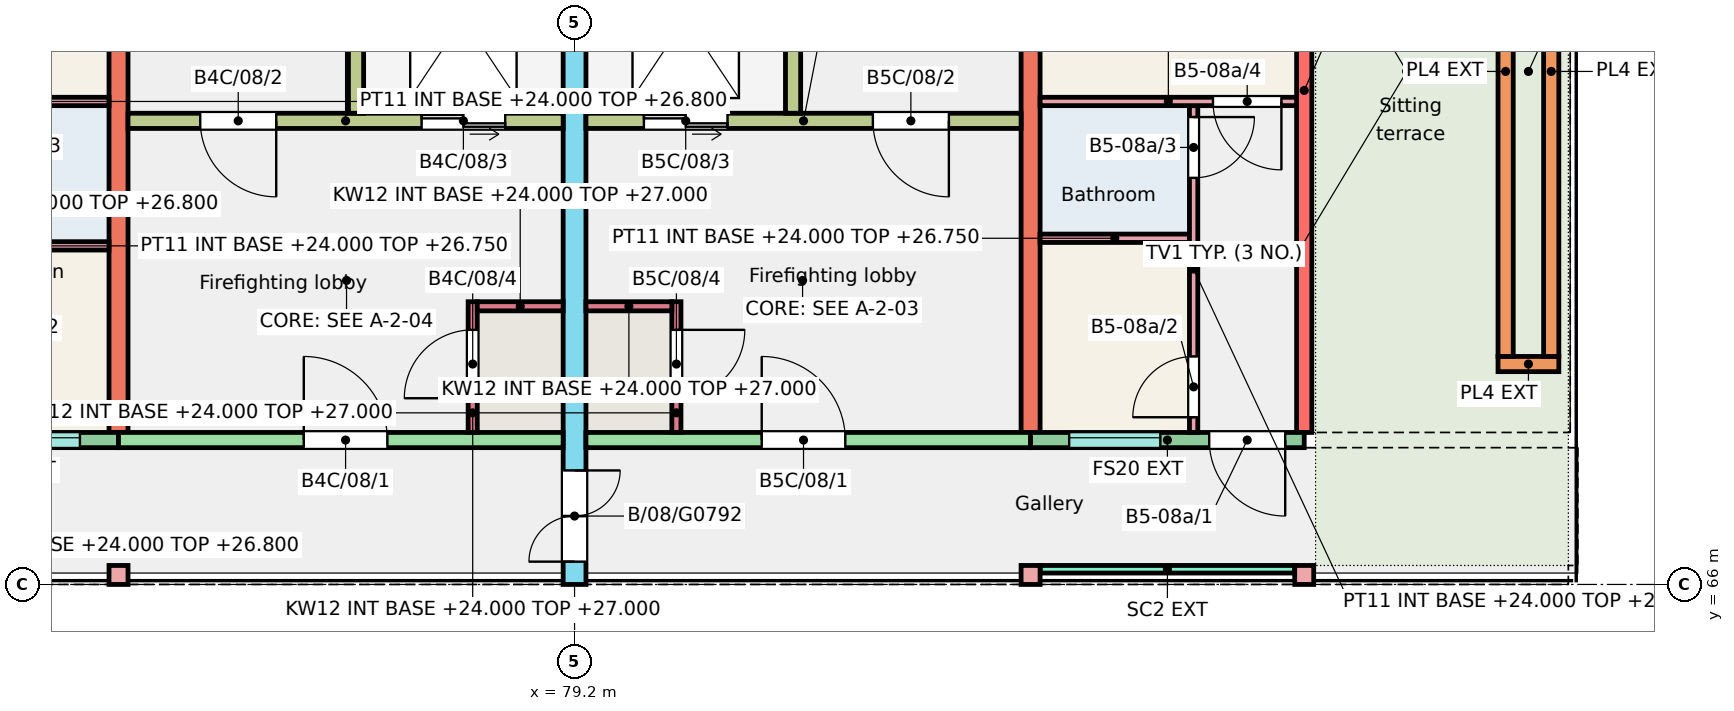
"""IFC4 building model, lengths in metres.
Left out: names, types, materials, properties, quantities, classifications, styles, units other than length and angle.
Written with IfcOpenShell. Run it as: python <this file> out.ifc"""

import sys

from ifc_helpers import new_model, si_unit, direction, frame, frame_2d, origin, origin_2d, place, context, subcontext, project, spatial, rectangle, extrude, element, fill, save


model = new_model("IFC4")
c1 = context("Model", 3, precision=1e-05, world=origin(), true_north=direction((0.0, 1.0)))
c2 = subcontext(c1, "Body", "Model", "MODEL_VIEW")
j1 = project(units=[si_unit("LENGTHUNIT", "METRE"), si_unit("PLANEANGLEUNIT", "RADIAN")], contexts=[c1])
p1 = place(None, origin())
s1 = spatial("IfcSite", under=j1, at=p1, CompositionType="ELEMENT")
p2 = place(p1, origin())
s2 = spatial("IfcBuilding", under=s1, at=p2, CompositionType="ELEMENT")
p3 = place(p2, frame((0.0, 0.0, 24.0)))
s3 = spatial("IfcBuildingStorey", under=s2, at=p3, CompositionType="ELEMENT", Elevation=24.0)
p4 = place(p3, frame((73.2, 68.0, 0.0), z_axis=(0.0, 0.0, 1.0), x_axis=(0.0, 1.0, 0.0)))
e1 = element("IfcWall", 1, at=p4, inside=s3, PredefinedType="SHEAR", context=c2, shape_type="SweptSolid", body=[
    extrude(rectangle(XDim=9.0, YDim=0.25, at=frame_2d((4.5, 0.0))), origin(), (0.0, 0.0, 1.0), 3.0),
])
p5 = place(p3, frame((79.2, 66.0, 0.0), z_axis=(0.0, 0.0, 1.0), x_axis=(0.0, 1.0, 0.0)))
e2 = element("IfcWall", 2, at=p5, inside=s3, PredefinedType="SHEAR", context=c2, shape_type="SweptSolid", body=[
    extrude(rectangle(XDim=11.0, YDim=0.3, at=frame_2d((5.5, 0.0))), origin(), (0.0, 0.0, 1.0), 3.0),
])
p6 = place(p5, frame((0.3, 0.0, 0.0)))
e3 = element("IfcOpeningElement", 3, at=p6, cuts=e2, PredefinedType="OPENING", context=c2, shape_type="SweptSolid", body=[
    extrude(rectangle(XDim=1.2, YDim=2.1, at=frame_2d((0.6, 1.05))), frame((0.0, 0.16, 0.0), z_axis=(0.0, -1.0, 0.0), x_axis=(1.0, 0.0, 0.0)), (0.0, 0.0, 1.0), 0.32),
])
p7 = place(p3, frame((85.2, 68.0, 0.0), z_axis=(0.0, 0.0, 1.0), x_axis=(0.0, 1.0, 0.0)))
e4 = element("IfcWall", 4, at=p7, inside=s3, PredefinedType="SHEAR", context=c2, shape_type="SweptSolid", body=[
    extrude(rectangle(XDim=9.0, YDim=0.25, at=frame_2d((4.5, 0.0))), origin(), (0.0, 0.0, 1.0), 3.0),
])
p8 = place(p3, frame((88.8, 68.0, 0.0), z_axis=(0.0, 0.0, 1.0), x_axis=(0.0, 1.0, 0.0)))
e5 = element("IfcWall", 5, at=p8, inside=s3, PredefinedType="SHEAR", context=c2, shape_type="SweptSolid", body=[
    extrude(rectangle(XDim=9.0, YDim=0.2, at=frame_2d((4.5, 0.0))), origin(), (0.0, 0.0, 1.0), 3.0),
])
p9 = place(p8, frame((7.552, 0.0, 0.9)))
e6 = element("IfcOpeningElement", 6, at=p9, cuts=e5, PredefinedType="OPENING", context=c2, shape_type="SweptSolid", body=[
    extrude(rectangle(XDim=1.2, YDim=1.5, at=frame_2d((0.6, 0.75))), frame((0.0, 0.11, 0.0), z_axis=(0.0, -1.0, 0.0), x_axis=(1.0, 0.0, 0.0)), (0.0, 0.0, 1.0), 0.22),
])
p10 = place(p8, frame((6.205, 0.0, 0.0)))
e7 = element("IfcOpeningElement", 7, at=p10, cuts=e5, PredefinedType="OPENING", context=c2, shape_type="SweptSolid", body=[
    extrude(rectangle(XDim=1.0, YDim=2.1, at=frame_2d((0.5, 1.05))), frame((0.0, 0.11, 0.0), z_axis=(0.0, -1.0, 0.0), x_axis=(1.0, 0.0, 0.0)), (0.0, 0.0, 1.0), 0.22),
])
p11 = place(p3, frame((69.6, 67.9, 0.0), z_axis=(0.0, 0.0, 1.0), x_axis=(1.0, 0.0, 0.0)))
e8 = element("IfcWall", 8, at=p11, inside=s3, PredefinedType="SOLIDWALL", context=c2, shape_type="SweptSolid", body=[
    extrude(rectangle(XDim=3.6, YDim=0.2, at=frame_2d((1.8, 0.0))), origin(), (0.0, 0.0, 1.0), 3.0),
])
p12 = place(p11, frame((1.893, 0.0, 1.1)))
e9 = element("IfcOpeningElement", 9, at=p12, cuts=e8, PredefinedType="OPENING", context=c2, shape_type="SweptSolid", body=[
    extrude(rectangle(XDim=1.2, YDim=1.3, at=frame_2d((0.6, 0.65))), frame((0.0, 0.11, 0.0), z_axis=(0.0, -1.0, 0.0), x_axis=(1.0, 0.0, 0.0)), (0.0, 0.0, 1.0), 0.22),
])
p13 = place(p11, frame((0.25, 0.0, 0.0)))
e10 = element("IfcOpeningElement", 10, at=p13, cuts=e8, PredefinedType="OPENING", context=c2, shape_type="SweptSolid", body=[
    extrude(rectangle(XDim=1.0, YDim=2.1, at=frame_2d((0.5, 1.05))), frame((0.0, 0.11, 0.0), z_axis=(0.0, -1.0, 0.0), x_axis=(1.0, 0.0, 0.0)), (0.0, 0.0, 1.0), 0.22),
])
p14 = place(p3, frame((73.2, 67.9, 0.0), z_axis=(0.0, 0.0, 1.0), x_axis=(1.0, 0.0, 0.0)))
e11 = element("IfcWall", 11, at=p14, inside=s3, PredefinedType="SHEAR", context=c2, shape_type="SweptSolid", body=[
    extrude(rectangle(XDim=5.85, YDim=0.2, at=frame_2d((2.925, 0.0))), origin(), (0.0, 0.0, 1.0), 3.0),
])
p15 = place(p14, frame((2.438, 0.0, 0.0)))
e12 = element("IfcOpeningElement", 12, at=p15, cuts=e11, PredefinedType="OPENING", context=c2, shape_type="SweptSolid", body=[
    extrude(rectangle(XDim=1.1, YDim=2.1, at=frame_2d((0.55, 1.05))), frame((0.0, 0.11, 0.0), z_axis=(0.0, -1.0, 0.0), x_axis=(1.0, 0.0, 0.0)), (0.0, 0.0, 1.0), 0.22),
])
p16 = place(p3, frame((73.325, 72.1, 0.0), z_axis=(0.0, 0.0, 1.0), x_axis=(1.0, 0.0, 0.0)))
e13 = element("IfcWall", 13, at=p16, inside=s3, PredefinedType="SHEAR", context=c2, shape_type="SweptSolid", body=[
    extrude(rectangle(XDim=5.725, YDim=0.2, at=frame_2d((2.863, 0.0))), origin(), (0.0, 0.0, 1.0), 3.0),
])
p17 = place(p16, frame((0.95, 0.0, 0.0)))
e14 = element("IfcOpeningElement", 14, at=p17, cuts=e13, PredefinedType="OPENING", context=c2, shape_type="SweptSolid", body=[
    extrude(rectangle(XDim=1.0, YDim=2.1, at=frame_2d((0.5, 1.05))), frame((0.0, 0.11, 0.0), z_axis=(0.0, -1.0, 0.0), x_axis=(1.0, 0.0, 0.0)), (0.0, 0.0, 1.0), 0.22),
])
p18 = place(p16, frame((3.863, 0.0, 0.0)))
e15 = element("IfcOpeningElement", 15, at=p18, cuts=e13, PredefinedType="OPENING", context=c2, shape_type="SweptSolid", body=[
    extrude(rectangle(XDim=1.1, YDim=2.1, at=frame_2d((0.55, 1.05))), frame((0.0, 0.11, 0.0), z_axis=(0.0, -1.0, 0.0), x_axis=(1.0, 0.0, 0.0)), (0.0, 0.0, 1.0), 0.22),
])
p19 = place(p3, frame((76.325, 72.2, 0.0), z_axis=(0.0, 0.0, 1.0), x_axis=(0.0, 1.0, 0.0)))
e16 = element("IfcWall", 16, at=p19, inside=s3, PredefinedType="SHEAR", context=c2, shape_type="SweptSolid", body=[
    extrude(rectangle(XDim=4.8, YDim=0.2, at=frame_2d((2.4, 0.0))), origin(), (0.0, 0.0, 1.0), 3.0),
])
p20 = place(p3, frame((77.86, 68.0, 0.0), z_axis=(0.0, 0.0, 1.0), x_axis=(0.0, 1.0, 0.0)))
e17 = element("IfcWall", 17, at=p20, inside=s3, PredefinedType="SHEAR", context=c2, shape_type="SweptSolid", body=[
    extrude(rectangle(XDim=1.72, YDim=0.12, at=frame_2d((0.86, 0.0))), origin(), (0.0, 0.0, 1.0), 3.0),
])
p21 = place(p20, frame((0.45, 0.0, 0.0)))
e18 = element("IfcOpeningElement", 18, at=p21, cuts=e17, PredefinedType="OPENING", context=c2, shape_type="SweptSolid", body=[
    extrude(rectangle(XDim=0.9, YDim=2.1, at=frame_2d((0.45, 1.05))), frame((0.0, 0.07, 0.0), z_axis=(0.0, -1.0, 0.0), x_axis=(1.0, 0.0, 0.0)), (0.0, 0.0, 1.0), 0.14),
])
p22 = place(p3, frame((77.92, 69.66, 0.0), z_axis=(0.0, 0.0, 1.0), x_axis=(1.0, 0.0, 0.0)))
e19 = element("IfcWall", 19, at=p22, inside=s3, PredefinedType="SHEAR", context=c2, shape_type="SweptSolid", body=[
    extrude(rectangle(XDim=1.13, YDim=0.12, at=frame_2d((0.565, 0.0))), origin(), (0.0, 0.0, 1.0), 3.0),
])
p23 = place(p3, frame((79.35, 67.9, 0.0), z_axis=(0.0, 0.0, 1.0), x_axis=(1.0, 0.0, 0.0)))
e20 = element("IfcWall", 20, at=p23, inside=s3, PredefinedType="SHEAR", context=c2, shape_type="SweptSolid", body=[
    extrude(rectangle(XDim=5.85, YDim=0.2, at=frame_2d((2.925, 0.0))), origin(), (0.0, 0.0, 1.0), 3.0),
])
p24 = place(p23, frame((2.312, 0.0, 0.0)))
e21 = element("IfcOpeningElement", 21, at=p24, cuts=e20, PredefinedType="OPENING", context=c2, shape_type="SweptSolid", body=[
    extrude(rectangle(XDim=1.1, YDim=2.1, at=frame_2d((0.55, 1.05))), frame((0.0, 0.11, 0.0), z_axis=(0.0, -1.0, 0.0), x_axis=(1.0, 0.0, 0.0)), (0.0, 0.0, 1.0), 0.22),
])
p25 = place(p3, frame((79.35, 72.1, 0.0), z_axis=(0.0, 0.0, 1.0), x_axis=(1.0, 0.0, 0.0)))
e22 = element("IfcWall", 22, at=p25, inside=s3, PredefinedType="SHEAR", context=c2, shape_type="SweptSolid", body=[
    extrude(rectangle(XDim=5.725, YDim=0.2, at=frame_2d((2.862, 0.0))), origin(), (0.0, 0.0, 1.0), 3.0),
])
p26 = place(p25, frame((3.775, 0.0, 0.0)))
e23 = element("IfcOpeningElement", 23, at=p26, cuts=e22, PredefinedType="OPENING", context=c2, shape_type="SweptSolid", body=[
    extrude(rectangle(XDim=1.0, YDim=2.1, at=frame_2d((0.5, 1.05))), frame((0.0, 0.11, 0.0), z_axis=(0.0, -1.0, 0.0), x_axis=(1.0, 0.0, 0.0)), (0.0, 0.0, 1.0), 0.22),
])
p27 = place(p25, frame((0.762, 0.0, 0.0)))
e24 = element("IfcOpeningElement", 24, at=p27, cuts=e22, PredefinedType="OPENING", context=c2, shape_type="SweptSolid", body=[
    extrude(rectangle(XDim=1.1, YDim=2.1, at=frame_2d((0.55, 1.05))), frame((0.0, 0.11, 0.0), z_axis=(0.0, -1.0, 0.0), x_axis=(1.0, 0.0, 0.0)), (0.0, 0.0, 1.0), 0.22),
])
p28 = place(p3, frame((82.075, 72.2, 0.0), z_axis=(0.0, 0.0, 1.0), x_axis=(0.0, 1.0, 0.0)))
e25 = element("IfcWall", 25, at=p28, inside=s3, PredefinedType="SHEAR", context=c2, shape_type="SweptSolid", body=[
    extrude(rectangle(XDim=4.8, YDim=0.2, at=frame_2d((2.4, 0.0))), origin(), (0.0, 0.0, 1.0), 3.0),
])
p29 = place(p3, frame((80.54, 68.0, 0.0), z_axis=(0.0, 0.0, 1.0), x_axis=(0.0, 1.0, 0.0)))
e26 = element("IfcWall", 26, at=p29, inside=s3, PredefinedType="SHEAR", context=c2, shape_type="SweptSolid", body=[
    extrude(rectangle(XDim=1.72, YDim=0.12, at=frame_2d((0.86, 0.0))), origin(), (0.0, 0.0, 1.0), 3.0),
])
p30 = place(p29, frame((0.45, 0.0, 0.0)))
e27 = element("IfcOpeningElement", 27, at=p30, cuts=e26, PredefinedType="OPENING", context=c2, shape_type="SweptSolid", body=[
    extrude(rectangle(XDim=0.9, YDim=2.1, at=frame_2d((0.45, 1.05))), frame((0.0, 0.07, 0.0), z_axis=(0.0, -1.0, 0.0), x_axis=(1.0, 0.0, 0.0)), (0.0, 0.0, 1.0), 0.14),
])
p31 = place(p3, frame((79.35, 69.66, 0.0), z_axis=(0.0, 0.0, 1.0), x_axis=(1.0, 0.0, 0.0)))
e28 = element("IfcWall", 28, at=p31, inside=s3, PredefinedType="SHEAR", context=c2, shape_type="SweptSolid", body=[
    extrude(rectangle(XDim=1.13, YDim=0.12, at=frame_2d((0.565, 0.0))), origin(), (0.0, 0.0, 1.0), 3.0),
])
p32 = place(p3, frame((85.2, 67.9, 0.0), z_axis=(0.0, 0.0, 1.0), x_axis=(1.0, 0.0, 0.0)))
e29 = element("IfcWall", 29, at=p32, inside=s3, PredefinedType="SOLIDWALL", context=c2, shape_type="SweptSolid", body=[
    extrude(rectangle(XDim=3.6, YDim=0.2, at=frame_2d((1.8, 0.0))), origin(), (0.0, 0.0, 1.0), 3.0),
])
p33 = place(p32, frame((0.508, 0.0, 1.1)))
e30 = element("IfcOpeningElement", 30, at=p33, cuts=e29, PredefinedType="OPENING", context=c2, shape_type="SweptSolid", body=[
    extrude(rectangle(XDim=1.2, YDim=1.3, at=frame_2d((0.6, 0.65))), frame((0.0, 0.11, 0.0), z_axis=(0.0, -1.0, 0.0), x_axis=(1.0, 0.0, 0.0)), (0.0, 0.0, 1.0), 0.22),
])
p34 = place(p32, frame((2.35, 0.0, 0.0)))
e31 = element("IfcOpeningElement", 31, at=p34, cuts=e29, PredefinedType="OPENING", context=c2, shape_type="SweptSolid", body=[
    extrude(rectangle(XDim=1.0, YDim=2.1, at=frame_2d((0.5, 1.05))), frame((0.0, 0.11, 0.0), z_axis=(0.0, -1.0, 0.0), x_axis=(1.0, 0.0, 0.0)), (0.0, 0.0, 1.0), 0.22),
])
for number, where, z_axis, x_axis in (
    (32, (73.2, 66.125, 0.0), (0.0, 0.0, 1.0), (1.0, 0.0, 0.0)),
    (33, (85.2, 66.125, 0.0), (0.0, 0.0, 1.0), (1.0, 0.0, 0.0)),
    (34, (88.8, 66.125, 0.0), (0.0, 0.0, 1.0), (1.0, 0.0, 0.0)),
):
    element("IfcColumn", number, at=place(p3, frame(where, z_axis=z_axis, x_axis=x_axis)), inside=s3, PredefinedType="COLUMN", context=c2, shape_type="SweptSolid", body=[
        extrude(rectangle(XDim=0.25, YDim=0.25, at=origin_2d()), origin(), (0.0, 0.0, 1.0), 3.0),
    ])
p35 = place(p3, frame((91.35, 68.9, 0.01), z_axis=(0.0, 0.0, 1.0), x_axis=(1.0, 0.0, 0.0)))
e35 = element("IfcWall", 35, at=p35, inside=s3, PredefinedType="SOLIDWALL", context=c2, shape_type="SweptSolid", body=[
    extrude(rectangle(XDim=0.8, YDim=0.2, at=frame_2d((0.4, 0.0))), origin(), (0.0, 0.0, 1.0), 0.45),
])
for number, where, z_axis, x_axis in (
    (36, (91.45, 69.0, 0.01), (0.0, 0.0, 1.0), (0.0, 1.0, 0.0)),
    (37, (92.05, 69.0, 0.01), (0.0, 0.0, 1.0), (0.0, 1.0, 0.0)),
):
    element("IfcWall", number, at=place(p3, frame(where, z_axis=z_axis, x_axis=x_axis)), inside=s3, PredefinedType="SOLIDWALL", context=c2, shape_type="SweptSolid", body=[
        extrude(rectangle(XDim=7.5, YDim=0.2, at=frame_2d((3.75, 0.0))), origin(), (0.0, 0.0, 1.0), 0.45),
    ])
p36 = place(p3, frame((85.325, 66.2, 0.0), z_axis=(0.0, 0.0, 1.0), x_axis=(1.0, 0.0, 0.0)))
e38 = element("IfcWall", 38, at=p36, inside=s3, PredefinedType="SOLIDWALL", context=c2, shape_type="SweptSolid", body=[
    extrude(rectangle(XDim=3.35, YDim=0.1, at=frame_2d((1.675, 0.0))), origin(), (0.0, 0.0, 1.0), 2.45),
])
p37 = place(p3, frame((71.11, 70.455, 0.0), z_axis=(0.0, 0.0, 1.0), x_axis=(1.0, 0.0, 0.0)))
e39 = element("IfcWall", 39, at=p37, inside=s3, PredefinedType="PARTITIONING", context=c2, shape_type="SweptSolid", body=[
    extrude(rectangle(XDim=1.965, YDim=0.11, at=frame_2d((0.982, 0.0))), origin(), (0.0, 0.0, 1.0), 2.8),
])
p38 = place(p3, frame((69.7, 72.355, 0.0), z_axis=(0.0, 0.0, 1.0), x_axis=(1.0, 0.0, 0.0)))
e40 = element("IfcWall", 40, at=p38, inside=s3, PredefinedType="PARTITIONING", context=c2, shape_type="SweptSolid", body=[
    extrude(rectangle(XDim=3.375, YDim=0.11, at=frame_2d((1.688, 0.0))), origin(), (0.0, 0.0, 1.0), 2.8),
])
p39 = place(p38, frame((0.2, 0.0, 0.0)))
e41 = element("IfcOpeningElement", 41, at=p39, cuts=e40, PredefinedType="OPENING", context=c2, shape_type="SweptSolid", body=[
    extrude(rectangle(XDim=0.9, YDim=2.1, at=frame_2d((0.45, 1.05))), frame((0.0, 0.065, 0.0), z_axis=(0.0, -1.0, 0.0), x_axis=(1.0, 0.0, 0.0)), (0.0, 0.0, 1.0), 0.13),
])
p40 = place(p3, frame((85.325, 70.555, 0.0), z_axis=(0.0, 0.0, 1.0), x_axis=(1.0, 0.0, 0.0)))
e42 = element("IfcWall", 42, at=p40, inside=s3, PredefinedType="PARTITIONING", context=c2, shape_type="SweptSolid", body=[
    extrude(rectangle(XDim=1.965, YDim=0.11, at=frame_2d((0.982, 0.0))), origin(), (0.0, 0.0, 1.0), 2.75),
])
p41 = place(p3, frame((87.345, 68.0, 0.0), z_axis=(0.0, 0.0, 1.0), x_axis=(0.0, 1.0, 0.0)))
e43 = element("IfcWall", 43, at=p41, inside=s3, PredefinedType="PARTITIONING", context=c2, shape_type="SweptSolid", body=[
    extrude(rectangle(XDim=4.3, YDim=0.11, at=frame_2d((2.15, 0.0))), origin(), (0.0, 0.0, 1.0), 2.75),
])
p42 = place(p41, frame((0.2, 0.0, 0.0)))
e44 = element("IfcOpeningElement", 44, at=p42, cuts=e43, PredefinedType="OPENING", context=c2, shape_type="SweptSolid", body=[
    extrude(rectangle(XDim=0.8, YDim=2.1, at=frame_2d((0.4, 1.05))), frame((0.0, 0.065, 0.0), z_axis=(0.0, -1.0, 0.0), x_axis=(1.0, 0.0, 0.0)), (0.0, 0.0, 1.0), 0.13),
])
p43 = place(p41, frame((3.35, 0.0, 0.0)))
e45 = element("IfcOpeningElement", 45, at=p43, cuts=e43, PredefinedType="OPENING", context=c2, shape_type="SweptSolid", body=[
    extrude(rectangle(XDim=0.8, YDim=2.1, at=frame_2d((0.4, 1.05))), frame((0.0, 0.065, 0.0), z_axis=(0.0, -1.0, 0.0), x_axis=(1.0, 0.0, 0.0)), (0.0, 0.0, 1.0), 0.13),
])
p44 = place(p3, frame((85.325, 72.355, 0.0), z_axis=(0.0, 0.0, 1.0), x_axis=(1.0, 0.0, 0.0)))
e46 = element("IfcWall", 46, at=p44, inside=s3, PredefinedType="PARTITIONING", context=c2, shape_type="SweptSolid", body=[
    extrude(rectangle(XDim=3.375, YDim=0.11, at=frame_2d((1.688, 0.0))), origin(), (0.0, 0.0, 1.0), 2.75),
])
p45 = place(p44, frame((2.275, 0.0, 0.0)))
e47 = element("IfcOpeningElement", 47, at=p45, cuts=e46, PredefinedType="OPENING", context=c2, shape_type="SweptSolid", body=[
    extrude(rectangle(XDim=0.9, YDim=2.1, at=frame_2d((0.45, 1.05))), frame((0.0, 0.065, 0.0), z_axis=(0.0, -1.0, 0.0), x_axis=(1.0, 0.0, 0.0)), (0.0, 0.0, 1.0), 0.13),
])
p46 = place(p12, origin())
e48 = element("IfcWindow", 48, at=p46, inside=s3, PartitioningType="SINGLE_PANEL", PredefinedType="WINDOW", context=c2, shape_type="SweptSolid", body=[
    extrude(rectangle(XDim=1.2, YDim=1.3, at=frame_2d((0.6, 0.65))), frame((0.0, 0.06, 0.0), z_axis=(0.0, -1.0, 0.0), x_axis=(1.0, 0.0, 0.0)), (0.0, 0.0, 1.0), 0.06),
])
fill(e9, e48)
p47 = place(p33, origin())
e49 = element("IfcWindow", 49, at=p47, inside=s3, PartitioningType="SINGLE_PANEL", PredefinedType="WINDOW", context=c2, shape_type="SweptSolid", body=[
    extrude(rectangle(XDim=1.2, YDim=1.3, at=frame_2d((0.6, 0.65))), frame((0.0, 0.06, 0.0), z_axis=(0.0, -1.0, 0.0), x_axis=(1.0, 0.0, 0.0)), (0.0, 0.0, 1.0), 0.06),
])
fill(e30, e49)
p48 = place(p34, origin())
e50 = element("IfcDoor", 50, at=p48, inside=s3, OperationType="SINGLE_SWING_RIGHT", PredefinedType="DOOR", context=c2, shape_type="SweptSolid", body=[
    extrude(rectangle(XDim=1.0, YDim=2.1, at=frame_2d((0.5, 1.05))), frame((0.0, 0.025, 0.0), z_axis=(0.0, -1.0, 0.0), x_axis=(1.0, 0.0, 0.0)), (0.0, 0.0, 1.0), 0.05),
])
fill(e31, e50)
p49 = place(p42, origin())
e51 = element("IfcDoor", 51, at=p49, inside=s3, OperationType="SINGLE_SWING_LEFT", PredefinedType="DOOR", context=c2, shape_type="SweptSolid", body=[
    extrude(rectangle(XDim=0.8, YDim=2.1, at=frame_2d((0.4, 1.05))), frame((0.0, 0.025, 0.0), z_axis=(0.0, -1.0, 0.0), x_axis=(1.0, 0.0, 0.0)), (0.0, 0.0, 1.0), 0.05),
])
fill(e44, e51)
p50 = place(p43, origin())
e52 = element("IfcDoor", 52, at=p50, inside=s3, OperationType="SINGLE_SWING_RIGHT", PredefinedType="DOOR", context=c2, shape_type="SweptSolid", body=[
    extrude(rectangle(XDim=0.8, YDim=2.1, at=frame_2d((0.4, 1.05))), frame((0.0, 0.025, 0.0), z_axis=(0.0, -1.0, 0.0), x_axis=(1.0, 0.0, 0.0)), (0.0, 0.0, 1.0), 0.05),
])
fill(e45, e52)
p51 = place(p45, origin())
e53 = element("IfcDoor", 53, at=p51, inside=s3, OperationType="SINGLE_SWING_RIGHT", PredefinedType="DOOR", context=c2, shape_type="SweptSolid", body=[
    extrude(rectangle(XDim=0.9, YDim=2.1, at=frame_2d((0.45, 1.05))), frame((0.0, 0.025, 0.0), z_axis=(0.0, -1.0, 0.0), x_axis=(1.0, 0.0, 0.0)), (0.0, 0.0, 1.0), 0.05),
])
fill(e47, e53)
p52 = place(p15, origin())
e54 = element("IfcDoor", 54, at=p52, inside=s3, OperationType="SINGLE_SWING_LEFT", PredefinedType="DOOR", context=c2, shape_type="SweptSolid", body=[
    extrude(rectangle(XDim=1.1, YDim=2.1, at=frame_2d((0.55, 1.05))), frame((0.0, 0.025, 0.0), z_axis=(0.0, -1.0, 0.0), x_axis=(1.0, 0.0, 0.0)), (0.0, 0.0, 1.0), 0.05),
])
fill(e12, e54)
p53 = place(p17, origin())
e55 = element("IfcDoor", 55, at=p53, inside=s3, OperationType="SINGLE_SWING_RIGHT", PredefinedType="DOOR", context=c2, shape_type="SweptSolid", body=[
    extrude(rectangle(XDim=1.0, YDim=2.1, at=frame_2d((0.5, 1.05))), frame((0.0, 0.025, 0.0), z_axis=(0.0, -1.0, 0.0), x_axis=(1.0, 0.0, 0.0)), (0.0, 0.0, 1.0), 0.05),
])
fill(e14, e55)
p54 = place(p18, origin())
e56 = element("IfcDoor", 56, at=p54, inside=s3, OperationType="DOUBLE_DOOR_SLIDING", PredefinedType="DOOR", context=c2, shape_type="SweptSolid", body=[
    extrude(rectangle(XDim=1.1, YDim=2.1, at=frame_2d((0.55, 1.05))), frame((0.0, 0.025, 0.0), z_axis=(0.0, -1.0, 0.0), x_axis=(1.0, 0.0, 0.0)), (0.0, 0.0, 1.0), 0.05),
])
fill(e15, e56)
p55 = place(p21, origin())
e57 = element("IfcDoor", 57, at=p55, inside=s3, OperationType="SINGLE_SWING_LEFT", PredefinedType="DOOR", context=c2, shape_type="SweptSolid", body=[
    extrude(rectangle(XDim=0.9, YDim=2.1, at=frame_2d((0.45, 1.05))), frame((0.0, 0.025, 0.0), z_axis=(0.0, -1.0, 0.0), x_axis=(1.0, 0.0, 0.0)), (0.0, 0.0, 1.0), 0.05),
])
fill(e18, e57)
p56 = place(p24, origin())
e58 = element("IfcDoor", 58, at=p56, inside=s3, OperationType="SINGLE_SWING_LEFT", PredefinedType="DOOR", context=c2, shape_type="SweptSolid", body=[
    extrude(rectangle(XDim=1.1, YDim=2.1, at=frame_2d((0.55, 1.05))), frame((0.0, 0.025, 0.0), z_axis=(0.0, -1.0, 0.0), x_axis=(1.0, 0.0, 0.0)), (0.0, 0.0, 1.0), 0.05),
])
fill(e21, e58)
p57 = place(p26, origin())
e59 = element("IfcDoor", 59, at=p57, inside=s3, OperationType="SINGLE_SWING_RIGHT", PredefinedType="DOOR", context=c2, shape_type="SweptSolid", body=[
    extrude(rectangle(XDim=1.0, YDim=2.1, at=frame_2d((0.5, 1.05))), frame((0.0, 0.025, 0.0), z_axis=(0.0, -1.0, 0.0), x_axis=(1.0, 0.0, 0.0)), (0.0, 0.0, 1.0), 0.05),
])
fill(e23, e59)
p58 = place(p27, origin())
e60 = element("IfcDoor", 60, at=p58, inside=s3, OperationType="DOUBLE_DOOR_SLIDING", PredefinedType="DOOR", context=c2, shape_type="SweptSolid", body=[
    extrude(rectangle(XDim=1.1, YDim=2.1, at=frame_2d((0.55, 1.05))), frame((0.0, 0.025, 0.0), z_axis=(0.0, -1.0, 0.0), x_axis=(1.0, 0.0, 0.0)), (0.0, 0.0, 1.0), 0.05),
])
fill(e24, e60)
p59 = place(p30, origin())
e61 = element("IfcDoor", 61, at=p59, inside=s3, OperationType="SINGLE_SWING_RIGHT", PredefinedType="DOOR", context=c2, shape_type="SweptSolid", body=[
    extrude(rectangle(XDim=0.9, YDim=2.1, at=frame_2d((0.45, 1.05))), frame((0.0, 0.025, 0.0), z_axis=(0.0, -1.0, 0.0), x_axis=(1.0, 0.0, 0.0)), (0.0, 0.0, 1.0), 0.05),
])
fill(e27, e61)
p60 = place(p6, origin())
e62 = element("IfcDoor", 62, at=p60, inside=s3, OperationType="DOUBLE_DOOR_SINGLE_SWING", PredefinedType="DOOR", context=c2, shape_type="SweptSolid", body=[
    extrude(rectangle(XDim=1.2, YDim=2.1, at=frame_2d((0.6, 1.05))), frame((0.0, 0.025, 0.0), z_axis=(0.0, -1.0, 0.0), x_axis=(1.0, 0.0, 0.0)), (0.0, 0.0, 1.0), 0.05),
])
fill(e3, e62)
save(model, sys.argv[1])
